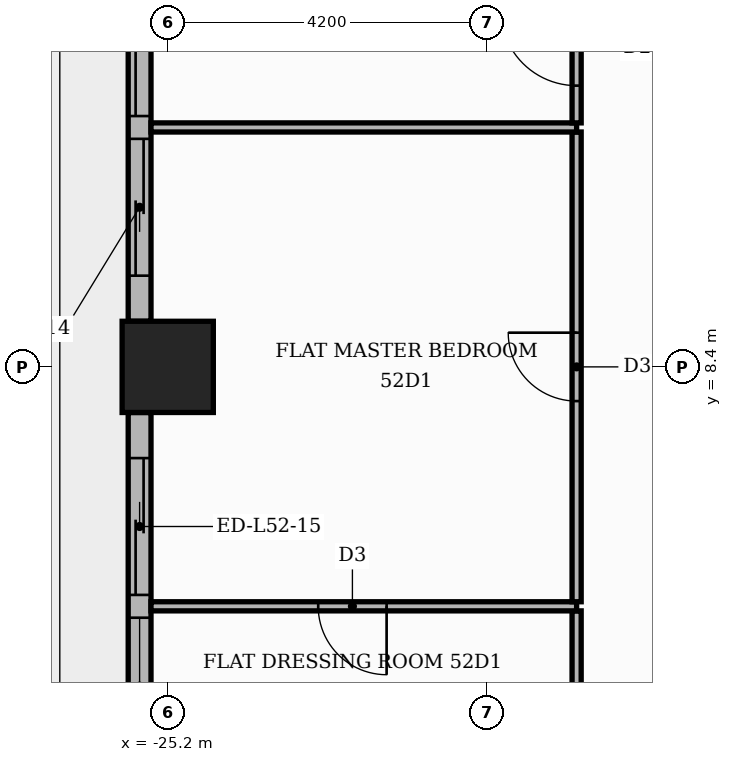
"""IFC4 building model, lengths in metres.
Left out: names, types, materials, properties, quantities, classifications, styles, units other than length and angle.
Written with IfcOpenShell. Run it as: python <this file> out.ifc"""

import sys

from ifc_helpers import new_model, si_unit, direction, frame, frame_2d, origin, origin_2d, place, context, subcontext, project, spatial, rectangle, extrude, element, fill, save


model = new_model("IFC4")
c1 = context("Model", 3, precision=1e-05, world=origin(), true_north=direction((0.0, 1.0)))
c2 = subcontext(c1, "Body", "Model", "MODEL_VIEW")
j1 = project(units=[si_unit("LENGTHUNIT", "METRE"), si_unit("PLANEANGLEUNIT", "RADIAN")], contexts=[c1])
p1 = place(None, origin())
s1 = spatial("IfcSite", under=j1, at=p1, CompositionType="ELEMENT")
p2 = place(p1, origin())
s2 = spatial("IfcBuilding", under=s1, at=p2, CompositionType="ELEMENT")
p3 = place(p2, frame((0.0, 0.0, 219.6)))
s3 = spatial("IfcBuildingStorey", under=s2, at=p3, CompositionType="ELEMENT", Elevation=219.6)
p4 = place(p3, frame((-25.2, 8.4, 0.0), z_axis=(0.0, 0.0, 1.0), x_axis=(1.0, 0.0, 0.0)))
e1 = element("IfcColumn", 1, at=p4, inside=s3, PredefinedType="COLUMN", context=c2, shape_type="SweptSolid", body=[
    extrude(rectangle(XDim=1.2, YDim=1.2, at=origin_2d()), origin(), (0.0, 0.0, 1.0), 3.9),
])
p5 = place(p3, frame((-25.57, 16.2, 0.0), z_axis=(0.0, 0.0, 1.0), x_axis=(0.0, -1.0, 0.0)))
e2 = element("IfcWall", 2, at=p5, inside=s3, PredefinedType="STANDARD", context=c2, shape_type="SweptSolid", body=[
    extrude(rectangle(XDim=7.2, YDim=0.3, at=frame_2d((3.6, 0.0))), origin(), (0.0, 0.0, 1.0), 3.48),
])
p6 = place(p5, frame((0.6, 0.0, 0.0)))
e3 = element("IfcOpeningElement", 3, at=p6, cuts=e2, PredefinedType="OPENING", context=c2, shape_type="SweptSolid", body=[
    extrude(rectangle(XDim=3.9, YDim=2.4, at=frame_2d((1.95, 1.2))), frame((0.0, 0.16, 0.0), z_axis=(0.0, -1.0, 0.0), x_axis=(1.0, 0.0, 0.0)), (0.0, 0.0, 1.0), 0.32),
])
p7 = place(p5, frame((4.8, 0.0, 0.0)))
e4 = element("IfcOpeningElement", 4, at=p7, cuts=e2, PredefinedType="OPENING", context=c2, shape_type="SweptSolid", body=[
    extrude(rectangle(XDim=1.8, YDim=2.4, at=frame_2d((0.9, 1.2))), frame((0.0, 0.16, 0.0), z_axis=(0.0, -1.0, 0.0), x_axis=(1.0, 0.0, 0.0)), (0.0, 0.0, 1.0), 0.32),
])
p8 = place(p3, frame((-25.57, 7.8, 0.0), z_axis=(0.0, 0.0, 1.0), x_axis=(0.0, -1.0, 0.0)))
e5 = element("IfcWall", 5, at=p8, inside=s3, PredefinedType="STANDARD", context=c2, shape_type="SweptSolid", body=[
    extrude(rectangle(XDim=7.2, YDim=0.3, at=frame_2d((3.6, 0.0))), origin(), (0.0, 0.0, 1.0), 3.48),
])
p9 = place(p8, frame((0.6, 0.0, 0.0)))
e6 = element("IfcOpeningElement", 6, at=p9, cuts=e5, PredefinedType="OPENING", context=c2, shape_type="SweptSolid", body=[
    extrude(rectangle(XDim=1.8, YDim=2.4, at=frame_2d((0.9, 1.2))), frame((0.0, 0.16, 0.0), z_axis=(0.0, -1.0, 0.0), x_axis=(1.0, 0.0, 0.0)), (0.0, 0.0, 1.0), 0.32),
])
p10 = place(p8, frame((2.7, 0.0, 0.9)))
e7 = element("IfcOpeningElement", 7, at=p10, cuts=e5, PredefinedType="OPENING", context=c2, shape_type="SweptSolid", body=[
    extrude(rectangle(XDim=1.8, YDim=2.1, at=frame_2d((0.9, 1.05))), frame((0.0, 0.16, 0.0), z_axis=(0.0, -1.0, 0.0), x_axis=(1.0, 0.0, 0.0)), (0.0, 0.0, 1.0), 0.32),
])
p11 = place(p8, frame((4.8, 0.0, 0.9)))
e8 = element("IfcOpeningElement", 8, at=p11, cuts=e5, PredefinedType="OPENING", context=c2, shape_type="SweptSolid", body=[
    extrude(rectangle(XDim=1.8, YDim=2.1, at=frame_2d((0.9, 1.05))), frame((0.0, 0.16, 0.0), z_axis=(0.0, -1.0, 0.0), x_axis=(1.0, 0.0, 0.0)), (0.0, 0.0, 1.0), 0.32),
])
p12 = place(p3, frame((-19.82, 3.21, 0.0), z_axis=(0.0, 0.0, 1.0), x_axis=(0.0, 1.0, 0.0)))
e9 = element("IfcWall", 9, at=p12, inside=s3, PredefinedType="PARTITIONING", context=c2, shape_type="SweptSolid", body=[
    extrude(rectangle(XDim=1.98, YDim=0.12, at=frame_2d((0.99, 0.0))), origin(), (0.0, 0.0, 1.0), 3.48),
])
p13 = place(p3, frame((-25.42, 5.25, 0.0), z_axis=(0.0, 0.0, 1.0), x_axis=(1.0, 0.0, 0.0)))
e10 = element("IfcWall", 10, at=p13, inside=s3, PredefinedType="PARTITIONING", context=c2, shape_type="SweptSolid", body=[
    extrude(rectangle(XDim=5.6, YDim=0.12, at=frame_2d((2.8, 0.0))), origin(), (0.0, 0.0, 1.0), 3.48),
])
p14 = place(p13, frame((2.2, 0.0, 0.0)))
e11 = element("IfcOpeningElement", 11, at=p14, cuts=e10, PredefinedType="OPENING", context=c2, shape_type="SweptSolid", body=[
    extrude(rectangle(XDim=0.9, YDim=2.1, at=frame_2d((0.45, 1.05))), frame((0.0, 0.07, 0.0), z_axis=(0.0, -1.0, 0.0), x_axis=(1.0, 0.0, 0.0)), (0.0, 0.0, 1.0), 0.14),
])
p15 = place(p3, frame((-19.82, 5.31, 0.0), z_axis=(0.0, 0.0, 1.0), x_axis=(0.0, 1.0, 0.0)))
e12 = element("IfcWall", 12, at=p15, inside=s3, PredefinedType="PARTITIONING", context=c2, shape_type="SweptSolid", body=[
    extrude(rectangle(XDim=6.18, YDim=0.12, at=frame_2d((3.09, 0.0))), origin(), (0.0, 0.0, 1.0), 3.48),
])
p16 = place(p15, frame((2.64, 0.0, 0.0)))
e13 = element("IfcOpeningElement", 13, at=p16, cuts=e12, PredefinedType="OPENING", context=c2, shape_type="SweptSolid", body=[
    extrude(rectangle(XDim=0.9, YDim=2.1, at=frame_2d((0.45, 1.05))), frame((0.0, 0.07, 0.0), z_axis=(0.0, -1.0, 0.0), x_axis=(1.0, 0.0, 0.0)), (0.0, 0.0, 1.0), 0.14),
])
p17 = place(p3, frame((-25.42, 11.55, 0.0), z_axis=(0.0, 0.0, 1.0), x_axis=(1.0, 0.0, 0.0)))
e14 = element("IfcWall", 14, at=p17, inside=s3, PredefinedType="PARTITIONING", context=c2, shape_type="SweptSolid", body=[
    extrude(rectangle(XDim=5.6, YDim=0.12, at=frame_2d((2.8, 0.0))), origin(), (0.0, 0.0, 1.0), 3.48),
])
p18 = place(p3, frame((-19.82, 11.61, 0.0), z_axis=(0.0, 0.0, 1.0), x_axis=(0.0, 1.0, 0.0)))
e15 = element("IfcWall", 15, at=p18, inside=s3, PredefinedType="PARTITIONING", context=c2, shape_type="SweptSolid", body=[
    extrude(rectangle(XDim=1.98, YDim=0.12, at=frame_2d((0.99, 0.0))), origin(), (0.0, 0.0, 1.0), 3.48),
])
p19 = place(p18, frame((0.49, 0.0, 0.0)))
e16 = element("IfcOpeningElement", 16, at=p19, cuts=e15, PredefinedType="OPENING", context=c2, shape_type="SweptSolid", body=[
    extrude(rectangle(XDim=1.0, YDim=2.1, at=frame_2d((0.5, 1.05))), frame((0.0, 0.07, 0.0), z_axis=(0.0, -1.0, 0.0), x_axis=(1.0, 0.0, 0.0)), (0.0, 0.0, 1.0), 0.14),
])
p20 = place(p6, origin())
e17 = element("IfcDoor", 17, at=p20, inside=s3, OperationType="SLIDING_TO_LEFT", PredefinedType="DOOR", context=c2, shape_type="SweptSolid", body=[
    extrude(rectangle(XDim=3.9, YDim=2.4, at=frame_2d((1.95, 1.2))), frame((0.0, 0.025, 0.0), z_axis=(0.0, -1.0, 0.0), x_axis=(1.0, 0.0, 0.0)), (0.0, 0.0, 1.0), 0.05),
])
fill(e3, e17)
p21 = place(p7, origin())
e18 = element("IfcDoor", 18, at=p21, inside=s3, OperationType="SLIDING_TO_RIGHT", PredefinedType="DOOR", context=c2, shape_type="SweptSolid", body=[
    extrude(rectangle(XDim=1.8, YDim=2.4, at=frame_2d((0.9, 1.2))), frame((0.0, 0.025, 0.0), z_axis=(0.0, -1.0, 0.0), x_axis=(1.0, 0.0, 0.0)), (0.0, 0.0, 1.0), 0.05),
])
fill(e4, e18)
p22 = place(p9, origin())
e19 = element("IfcDoor", 19, at=p22, inside=s3, OperationType="SLIDING_TO_LEFT", PredefinedType="DOOR", context=c2, shape_type="SweptSolid", body=[
    extrude(rectangle(XDim=1.8, YDim=2.4, at=frame_2d((0.9, 1.2))), frame((0.0, 0.025, 0.0), z_axis=(0.0, -1.0, 0.0), x_axis=(1.0, 0.0, 0.0)), (0.0, 0.0, 1.0), 0.05),
])
fill(e6, e19)
p23 = place(p10, origin())
e20 = element("IfcWindow", 20, at=p23, inside=s3, PartitioningType="SINGLE_PANEL", PredefinedType="WINDOW", context=c2, shape_type="SweptSolid", body=[
    extrude(rectangle(XDim=1.8, YDim=2.1, at=frame_2d((0.9, 1.05))), frame((0.0, 0.03, 0.0), z_axis=(0.0, -1.0, 0.0), x_axis=(1.0, 0.0, 0.0)), (0.0, 0.0, 1.0), 0.06),
])
fill(e7, e20)
p24 = place(p19, origin())
e21 = element("IfcDoor", 21, at=p24, inside=s3, OperationType="SINGLE_SWING_RIGHT", PredefinedType="DOOR", context=c2, shape_type="SweptSolid", body=[
    extrude(rectangle(XDim=1.0, YDim=2.1, at=frame_2d((0.5, 1.05))), frame((0.0, 0.025, 0.0), z_axis=(0.0, -1.0, 0.0), x_axis=(1.0, 0.0, 0.0)), (0.0, 0.0, 1.0), 0.05),
])
fill(e16, e21)
p25 = place(p16, origin())
e22 = element("IfcDoor", 22, at=p25, inside=s3, OperationType="SINGLE_SWING_RIGHT", PredefinedType="DOOR", context=c2, shape_type="SweptSolid", body=[
    extrude(rectangle(XDim=0.9, YDim=2.1, at=frame_2d((0.45, 1.05))), frame((0.0, 0.025, 0.0), z_axis=(0.0, -1.0, 0.0), x_axis=(1.0, 0.0, 0.0)), (0.0, 0.0, 1.0), 0.05),
])
fill(e13, e22)
p26 = place(p14, frame((0.9, 0.0, 0.0), z_axis=(0.0, 0.0, 1.0), x_axis=(-1.0, 0.0, 0.0)))
e23 = element("IfcDoor", 23, at=p26, inside=s3, OperationType="SINGLE_SWING_RIGHT", PredefinedType="DOOR", context=c2, shape_type="SweptSolid", body=[
    extrude(rectangle(XDim=0.9, YDim=2.1, at=frame_2d((0.45, 1.05))), frame((0.0, 0.025, 0.0), z_axis=(0.0, -1.0, 0.0), x_axis=(1.0, 0.0, 0.0)), (0.0, 0.0, 1.0), 0.05),
])
fill(e11, e23)
save(model, sys.argv[1])
